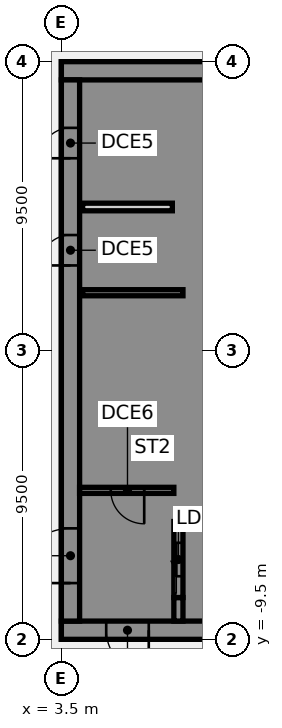
"""IFC4 building model, lengths in metres.
Left out: names, types, materials, properties, quantities, classifications, styles, units other than length and angle.
Written with IfcOpenShell. Run it as: python <this file> out.ifc"""

import sys

from ifc_helpers import new_model, si_unit, direction, frame, frame_2d, origin, place, context, subcontext, project, spatial, polyline, rectangle, outline, extrude, element, fill, save


model = new_model("IFC4")
c1 = context("Model", 3, precision=1e-05, world=origin(), true_north=direction((0.0, 1.0)))
c2 = subcontext(c1, "Body", "Model", "MODEL_VIEW")
j1 = project(units=[si_unit("LENGTHUNIT", "METRE"), si_unit("PLANEANGLEUNIT", "RADIAN")], contexts=[c1])
p1 = place(None, origin())
s1 = spatial("IfcSite", under=j1, at=p1, CompositionType="ELEMENT")
p2 = place(p1, origin())
s2 = spatial("IfcBuilding", under=s1, at=p2, CompositionType="ELEMENT")
p3 = place(p2, frame((0.0, 0.0, 113.5)))
s3 = spatial("IfcBuildingStorey", under=s2, at=p3, CompositionType="ELEMENT", Elevation=113.5)
p4 = place(p3, frame((16.5, -9.2, 0.0), z_axis=(0.0, 0.0, 1.0), x_axis=(-1.0, 0.0, 0.0)))
e1 = element("IfcWall", 1, at=p4, inside=s3, PredefinedType="SHEAR", context=c2, shape_type="SweptSolid", body=[
    extrude(rectangle(XDim=13.0, YDim=0.6, at=frame_2d((6.5, 0.0))), origin(), (0.0, 0.0, 1.0), 3.61),
])
p5 = place(p4, frame((4.15, 0.0, 0.0)))
e2 = element("IfcOpeningElement", 2, at=p5, cuts=e1, PredefinedType="OPENING", context=c2, shape_type="SweptSolid", body=[
    extrude(rectangle(XDim=1.4, YDim=2.1, at=frame_2d((0.7, 1.05))), frame((0.0, 0.31, 0.0), z_axis=(0.0, -1.0, 0.0), x_axis=(1.0, 0.0, 0.0)), (0.0, 0.0, 1.0), 0.62),
])
p6 = place(p4, frame((10.125, 0.0, 0.0)))
e3 = element("IfcOpeningElement", 3, at=p6, cuts=e1, PredefinedType="OPENING", context=c2, shape_type="SweptSolid", body=[
    extrude(rectangle(XDim=1.4, YDim=2.1, at=frame_2d((0.7, 1.05))), frame((0.0, 0.31, 0.0), z_axis=(0.0, -1.0, 0.0), x_axis=(1.0, 0.0, 0.0)), (0.0, 0.0, 1.0), 0.62),
])
p7 = place(p3, frame((16.5, 9.2, 0.0), z_axis=(0.0, 0.0, 1.0), x_axis=(-1.0, 0.0, 0.0)))
e4 = element("IfcWall", 4, at=p7, inside=s3, PredefinedType="SHEAR", context=c2, shape_type="SweptSolid", body=[
    extrude(rectangle(XDim=13.0, YDim=0.6, at=frame_2d((6.5, 0.0))), origin(), (0.0, 0.0, 1.0), 3.61),
])
p8 = place(p3, origin())
e5 = element("IfcWall", 5, at=p8, inside=s3, PredefinedType="SHEAR", context=c2, shape_type="SweptSolid", body=[
    extrude(outline(polyline([(9.8, -5.375), (7.5, -5.375), (7.5, -2.875), (9.8, -2.875), (9.8, -2.625), (7.5, -2.625), (7.5, -0.125), (9.8, -0.125), (9.8, 0.125), (7.5, 0.125), (7.5, 2.625), (9.8, 2.625), (9.8, 2.875), (7.5, 2.875), (7.5, 5.375), (9.8, 5.375), (9.8, 5.625), (7.5, 5.625), (7.5, 8.125), (9.8, 8.125), (9.8, 8.9), (7.5, 8.9), (7.2, 8.9), (7.2, -5.625), (7.5, -5.625), (9.8, -5.625), (9.8, -5.375)])), origin(), (0.0, 0.0, 1.0), 3.61),
])
p9 = place(p3, origin())
e6 = element("IfcWall", 6, at=p9, inside=s3, PredefinedType="SHEAR", context=c2, shape_type="SweptSolid", body=[
    extrude(outline(polyline([(7.5, -8.125), (7.5, -8.9), (9.8, -8.9), (9.8, -8.125), (9.8, -5.625), (9.55, -5.625), (9.55, -8.125), (7.5, -8.125)])), origin(), (0.0, 0.0, 1.0), 3.61),
])
p10 = place(p3, frame((7.35, -8.9, 0.0), z_axis=(0.0, 0.0, 1.0), x_axis=(0.0, 1.0, 0.0)))
e7 = element("IfcWall", 7, at=p10, inside=s3, PredefinedType="SHEAR", context=c2, shape_type="SweptSolid", body=[
    extrude(rectangle(XDim=0.775, YDim=0.3, at=frame_2d((0.387, 0.0))), origin(), (0.0, 0.0, 1.0), 3.61),
])
p11 = place(p3, frame((7.5, 1.9, 0.0), z_axis=(0.0, 0.0, 1.0), x_axis=(-1.0, 0.0, 0.0)))
e8 = element("IfcWall", 8, at=p11, inside=s3, PredefinedType="SHEAR", context=c2, shape_type="SweptSolid", body=[
    extrude(rectangle(XDim=3.3, YDim=0.2, at=frame_2d((1.65, 0.0))), origin(), (0.0, 0.0, 1.0), 3.61),
])
p12 = place(p3, frame((7.35, -8.125, 0.0), z_axis=(0.0, 0.0, 1.0), x_axis=(0.0, 1.0, 0.0)))
e9 = element("IfcWall", 9, at=p12, inside=s3, PredefinedType="SHEAR", context=c2, shape_type="SweptSolid", body=[
    extrude(rectangle(XDim=2.5, YDim=0.3, at=frame_2d((1.25, 0.0))), origin(), (0.0, 0.0, 1.0), 3.61),
])
p13 = place(p12, frame((0.7, 0.0, 0.0)))
e10 = element("IfcOpeningElement", 10, at=p13, cuts=e9, PredefinedType="OPENING", context=c2, shape_type="SweptSolid", body=[
    extrude(rectangle(XDim=1.1, YDim=2.1, at=frame_2d((0.55, 1.05))), frame((0.0, 0.16, 0.0), z_axis=(0.0, -1.0, 0.0), x_axis=(1.0, 0.0, 0.0)), (0.0, 0.0, 1.0), 0.32),
])
p14 = place(p3, frame((3.8, -8.9, 0.0), z_axis=(0.0, 0.0, 1.0), x_axis=(0.0, 1.0, 0.0)))
e11 = element("IfcWall", 11, at=p14, inside=s3, PredefinedType="SHEAR", context=c2, shape_type="SweptSolid", body=[
    extrude(rectangle(XDim=17.8, YDim=0.6, at=frame_2d((8.9, 0.0))), origin(), (0.0, 0.0, 1.0), 3.61),
])
p15 = place(p14, frame((1.25, 0.0, 0.0)))
e12 = element("IfcOpeningElement", 12, at=p15, cuts=e11, PredefinedType="OPENING", context=c2, shape_type="SweptSolid", body=[
    extrude(rectangle(XDim=1.8, YDim=2.1, at=frame_2d((0.9, 1.05))), frame((0.0, 0.31, 0.0), z_axis=(0.0, -1.0, 0.0), x_axis=(1.0, 0.0, 0.0)), (0.0, 0.0, 1.0), 0.62),
])
p16 = place(p14, frame((11.698, 0.0, 0.0)))
e13 = element("IfcOpeningElement", 13, at=p16, cuts=e11, PredefinedType="OPENING", context=c2, shape_type="SweptSolid", body=[
    extrude(rectangle(XDim=1.0, YDim=2.1, at=frame_2d((0.5, 1.05))), frame((0.0, 0.31, 0.0), z_axis=(0.0, -1.0, 0.0), x_axis=(1.0, 0.0, 0.0)), (0.0, 0.0, 1.0), 0.62),
])
p17 = place(p14, frame((15.222, 0.0, 0.0)))
e14 = element("IfcOpeningElement", 14, at=p17, cuts=e11, PredefinedType="OPENING", context=c2, shape_type="SweptSolid", body=[
    extrude(rectangle(XDim=1.0, YDim=2.1, at=frame_2d((0.5, 1.05))), frame((0.0, 0.31, 0.0), z_axis=(0.0, -1.0, 0.0), x_axis=(1.0, 0.0, 0.0)), (0.0, 0.0, 1.0), 0.62),
])
p18 = place(p3, frame((7.15, 4.72, 0.0), z_axis=(0.0, 0.0, 1.0), x_axis=(-1.0, 0.0, 0.0)))
e15 = element("IfcWall", 15, at=p18, inside=s3, PredefinedType="PARTITIONING", context=c2, shape_type="SweptSolid", body=[
    extrude(rectangle(XDim=2.95, YDim=0.25, at=frame_2d((1.475, 0.0))), origin(), (0.0, 0.0, 1.0), 3.61),
])
p19 = place(p3, frame((7.2, -4.6, 0.0), z_axis=(0.0, 0.0, 1.0), x_axis=(-1.0, 0.0, 0.0)))
e16 = element("IfcWall", 16, at=p19, inside=s3, PredefinedType="SHEAR", context=c2, shape_type="SweptSolid", body=[
    extrude(rectangle(XDim=3.1, YDim=0.2, at=frame_2d((1.55, 0.0))), origin(), (0.0, 0.0, 1.0), 3.61),
])
p20 = place(p19, frame((0.975, 0.0, 0.0)))
e17 = element("IfcOpeningElement", 17, at=p20, cuts=e16, PredefinedType="OPENING", context=c2, shape_type="SweptSolid", body=[
    extrude(rectangle(XDim=1.1, YDim=2.1, at=frame_2d((0.55, 1.05))), frame((0.0, 0.11, 0.0), z_axis=(0.0, -1.0, 0.0), x_axis=(1.0, 0.0, 0.0)), (0.0, 0.0, 1.0), 0.22),
])
p21 = place(p6, origin())
e18 = element("IfcDoor", 18, at=p21, inside=s3, OperationType="SINGLE_SWING_LEFT", PredefinedType="DOOR", context=c2, shape_type="SweptSolid", body=[
    extrude(rectangle(XDim=1.4, YDim=2.1, at=frame_2d((0.7, 1.05))), frame((0.0, 0.025, 0.0), z_axis=(0.0, -1.0, 0.0), x_axis=(1.0, 0.0, 0.0)), (0.0, 0.0, 1.0), 0.05),
])
fill(e3, e18)
p22 = place(p15, origin())
e19 = element("IfcDoor", 19, at=p22, inside=s3, OperationType="SINGLE_SWING_LEFT", PredefinedType="DOOR", context=c2, shape_type="SweptSolid", body=[
    extrude(rectangle(XDim=1.8, YDim=2.1, at=frame_2d((0.9, 1.05))), frame((0.0, 0.025, 0.0), z_axis=(0.0, -1.0, 0.0), x_axis=(1.0, 0.0, 0.0)), (0.0, 0.0, 1.0), 0.05),
])
fill(e12, e19)
p23 = place(p16, origin())
e20 = element("IfcDoor", 20, at=p23, inside=s3, OperationType="SINGLE_SWING_LEFT", PredefinedType="DOOR", context=c2, shape_type="SweptSolid", body=[
    extrude(rectangle(XDim=1.0, YDim=2.1, at=frame_2d((0.5, 1.05))), frame((0.0, -0.225, 0.0), z_axis=(0.0, -1.0, 0.0), x_axis=(1.0, 0.0, 0.0)), (0.0, 0.0, 1.0), 0.05),
])
fill(e13, e20)
p24 = place(p17, origin())
e21 = element("IfcDoor", 21, at=p24, inside=s3, OperationType="SINGLE_SWING_LEFT", PredefinedType="DOOR", context=c2, shape_type="SweptSolid", body=[
    extrude(rectangle(XDim=1.0, YDim=2.1, at=frame_2d((0.5, 1.05))), frame((0.0, -0.225, 0.0), z_axis=(0.0, -1.0, 0.0), x_axis=(1.0, 0.0, 0.0)), (0.0, 0.0, 1.0), 0.05),
])
fill(e14, e21)
p25 = place(p20, origin())
e22 = element("IfcDoor", 22, at=p25, inside=s3, OperationType="SINGLE_SWING_LEFT", PredefinedType="DOOR", context=c2, shape_type="SweptSolid", body=[
    extrude(rectangle(XDim=1.1, YDim=2.1, at=frame_2d((0.55, 1.05))), frame((0.0, 0.025, 0.0), z_axis=(0.0, -1.0, 0.0), x_axis=(1.0, 0.0, 0.0)), (0.0, 0.0, 1.0), 0.05),
])
fill(e17, e22)
p26 = place(p13, origin())
e23 = element("IfcDoor", 23, at=p26, inside=s3, OperationType="SLIDING_TO_LEFT", PredefinedType="DOOR", context=c2, shape_type="SweptSolid", body=[
    extrude(rectangle(XDim=1.1, YDim=2.1, at=frame_2d((0.55, 1.05))), frame((0.0, 0.025, 0.0), z_axis=(0.0, -1.0, 0.0), x_axis=(1.0, 0.0, 0.0)), (0.0, 0.0, 1.0), 0.05),
])
fill(e10, e23)
save(model, sys.argv[1])
